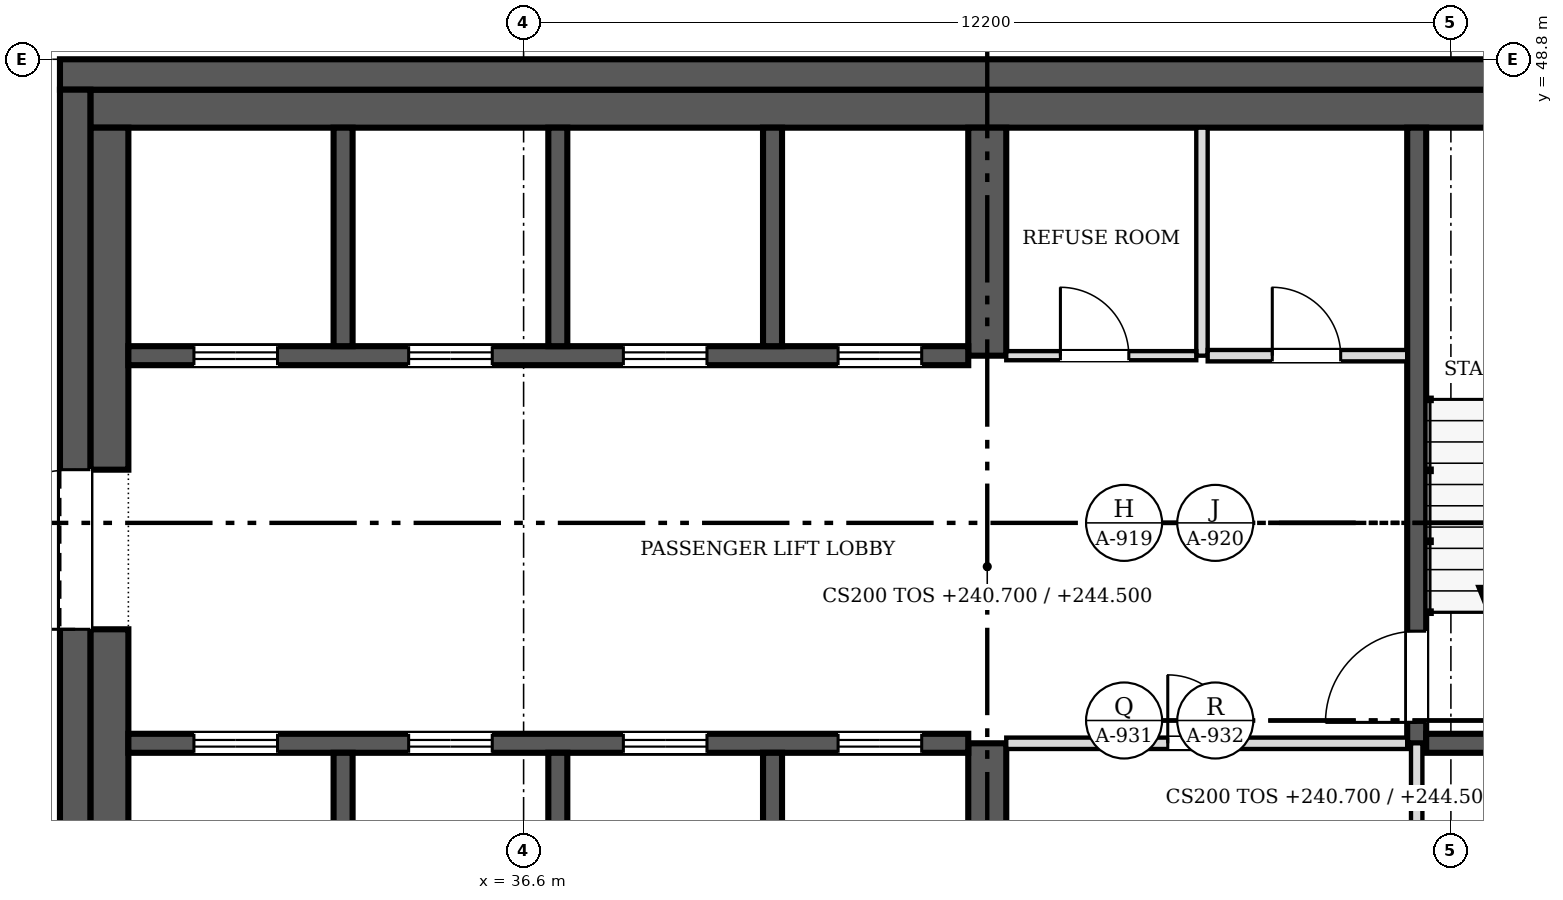
"""IFC4 building model, lengths in metres.
Left out: names, types, materials, properties, quantities, classifications, styles, units other than length and angle.
Written with IfcOpenShell. Run it as: python <this file> out.ifc"""

import sys

from ifc_helpers import new_model, si_unit, direction, frame, frame_2d, origin, place, context, subcontext, project, spatial, rectangle, extrude, source, transform, mapped, element, fill, save


model = new_model("IFC4")
c1 = context("Model", 3, precision=1e-05, world=origin(), true_north=direction((0.0, 1.0)))
c2 = subcontext(c1, "Body", "Model", "MODEL_VIEW")
j1 = project(units=[si_unit("LENGTHUNIT", "METRE"), si_unit("PLANEANGLEUNIT", "RADIAN")], contexts=[c1])
p1 = place(None, origin())
s1 = spatial("IfcSite", under=j1, at=p1, CompositionType="ELEMENT")
p2 = place(p1, origin())
s2 = spatial("IfcBuilding", under=s1, at=p2, CompositionType="ELEMENT")
p3 = place(p2, frame((0.0, 0.0, 240.7)))
s3 = spatial("IfcBuildingStorey", under=s2, at=p3, CompositionType="ELEMENT", Elevation=240.7)
p4 = place(p3, frame((30.7, 24.8, 0.0), z_axis=(0.0, 0.0, 1.0), x_axis=(0.0, 1.0, 0.0)))
e1 = element("IfcWall", 1, at=p4, inside=s3, PredefinedType="SHEAR", context=c2, shape_type="SweptSolid", body=[
    extrude(rectangle(XDim=23.6, YDim=0.4, at=frame_2d((11.8, 0.0))), origin(), (0.0, 0.0, 1.0), 3.8),
])
m1 = source(origin(), c2, "Body", "SweptSolid", [
    extrude(rectangle(XDim=2.1, YDim=2.4, at=frame_2d((1.05, 1.2))), frame((0.0, 0.21, 0.0), z_axis=(0.0, -1.0, 0.0), x_axis=(1.0, 0.0, 0.0)), (0.0, 0.0, 1.0), 0.42),
])
p5 = place(p4, frame((5.0, 0.0, 0.0)))
e2 = element("IfcOpeningElement", 2, at=p5, cuts=e1, PredefinedType="OPENING", context=c2, shape_type="MappedRepresentation", body=[
    mapped(m1, transform((0.0, 0.0, 0.0), scale=1.0)),
])
p6 = place(p4, frame((16.5, 0.0, 0.0)))
e3 = element("IfcOpeningElement", 3, at=p6, cuts=e1, PredefinedType="OPENING", context=c2, shape_type="MappedRepresentation", body=[
    mapped(m1, transform((0.0, 0.0, 0.0), scale=1.0)),
])
p7 = place(p3, frame((30.5, 48.6, 0.0), z_axis=(0.0, 0.0, 1.0), x_axis=(1.0, 0.0, 0.0)))
e4 = element("IfcWall", 4, at=p7, inside=s3, PredefinedType="SHEAR", context=c2, shape_type="SweptSolid", body=[
    extrude(rectangle(XDim=24.4, YDim=0.4, at=frame_2d((12.2, 0.0))), origin(), (0.0, 0.0, 1.0), 3.8),
])
p8 = place(p3, frame((30.9, 48.15, 0.0), z_axis=(0.0, 0.0, 1.0), x_axis=(1.0, 0.0, 0.0)))
e5 = element("IfcWall", 5, at=p8, inside=s3, PredefinedType="SOLIDWALL", context=c2, shape_type="SweptSolid", body=[
    extrude(rectangle(XDim=23.6, YDim=0.5, at=frame_2d((11.8, 0.0))), origin(), (0.0, 0.0, 1.0), 3.8),
])
p9 = place(p3, frame((31.15, 31.9, 0.0), z_axis=(0.0, 0.0, 1.0), x_axis=(0.0, 1.0, 0.0)))
e6 = element("IfcWall", 6, at=p9, inside=s3, PredefinedType="SOLIDWALL", context=c2, shape_type="SweptSolid", body=[
    extrude(rectangle(XDim=9.4, YDim=0.5, at=frame_2d((4.7, 0.0))), origin(), (0.0, 0.0, 1.0), 3.8),
])
p10 = place(p3, frame((31.15, 43.4, 0.0), z_axis=(0.0, 0.0, 1.0), x_axis=(0.0, 1.0, 0.0)))
e7 = element("IfcWall", 7, at=p10, inside=s3, PredefinedType="SOLIDWALL", context=c2, shape_type="SweptSolid", body=[
    extrude(rectangle(XDim=4.5, YDim=0.5, at=frame_2d((2.25, 0.0))), origin(), (0.0, 0.0, 1.0), 3.8),
])
p11 = place(p3, frame((42.7, 36.85, 0.0), z_axis=(0.0, 0.0, 1.0), x_axis=(0.0, 1.0, 0.0)))
e8 = element("IfcWall", 8, at=p11, inside=s3, PredefinedType="SHEAR", context=c2, shape_type="SweptSolid", body=[
    extrude(rectangle(XDim=2.95, YDim=0.5, at=frame_2d((1.475, 0.0))), origin(), (0.0, 0.0, 1.0), 3.8),
])
p12 = place(p3, frame((42.7, 44.9, 0.0), z_axis=(0.0, 0.0, 1.0), x_axis=(0.0, 1.0, 0.0)))
e9 = element("IfcWall", 9, at=p12, inside=s3, PredefinedType="SHEAR", context=c2, shape_type="SweptSolid", body=[
    extrude(rectangle(XDim=3.0, YDim=0.5, at=frame_2d((1.5, 0.0))), origin(), (0.0, 0.0, 1.0), 3.8),
])
p13 = place(p3, frame((31.4, 39.8, 0.0), z_axis=(0.0, 0.0, 1.0), x_axis=(1.0, 0.0, 0.0)))
e10 = element("IfcWall", 10, at=p13, inside=s3, PredefinedType="SOLIDWALL", context=c2, shape_type="SweptSolid", body=[
    extrude(rectangle(XDim=11.05, YDim=0.25, at=frame_2d((5.525, 0.0))), origin(), (0.0, 0.0, 1.0), 3.8),
])
m2 = source(origin(), c2, "Body", "SweptSolid", [
    extrude(rectangle(XDim=1.1, YDim=2.1, at=frame_2d((0.55, 1.05))), frame((0.0, 0.135, 0.0), z_axis=(0.0, -1.0, 0.0), x_axis=(1.0, 0.0, 0.0)), (0.0, 0.0, 1.0), 0.27),
])
p14 = place(p13, frame((0.863, 0.0, 0.0)))
e11 = element("IfcOpeningElement", 11, at=p14, cuts=e10, PredefinedType="OPENING", context=c2, shape_type="MappedRepresentation", body=[
    mapped(m2, transform((0.0, 0.0, 0.0), scale=1.0)),
])
p15 = place(p13, frame((3.688, 0.0, 0.0)))
e12 = element("IfcOpeningElement", 12, at=p15, cuts=e10, PredefinedType="OPENING", context=c2, shape_type="MappedRepresentation", body=[
    mapped(m2, transform((0.0, 0.0, 0.0), scale=1.0)),
])
p16 = place(p13, frame((6.512, 0.0, 0.0)))
e13 = element("IfcOpeningElement", 13, at=p16, cuts=e10, PredefinedType="OPENING", context=c2, shape_type="MappedRepresentation", body=[
    mapped(m2, transform((0.0, 0.0, 0.0), scale=1.0)),
])
p17 = place(p13, frame((9.337, 0.0, 0.0)))
e14 = element("IfcOpeningElement", 14, at=p17, cuts=e10, PredefinedType="OPENING", context=c2, shape_type="MappedRepresentation", body=[
    mapped(m2, transform((0.0, 0.0, 0.0), scale=1.0)),
])
p18 = place(p3, frame((42.45, 44.9, 0.0), z_axis=(0.0, 0.0, 1.0), x_axis=(-1.0, 0.0, 0.0)))
e15 = element("IfcWall", 15, at=p18, inside=s3, PredefinedType="SOLIDWALL", context=c2, shape_type="SweptSolid", body=[
    extrude(rectangle(XDim=11.05, YDim=0.25, at=frame_2d((5.525, 0.0))), origin(), (0.0, 0.0, 1.0), 3.8),
])
p19 = place(p18, frame((9.087, 0.0, 0.0)))
e16 = element("IfcOpeningElement", 16, at=p19, cuts=e15, PredefinedType="OPENING", context=c2, shape_type="MappedRepresentation", body=[
    mapped(m2, transform((0.0, 0.0, 0.0), scale=1.0)),
])
p20 = place(p18, frame((6.262, 0.0, 0.0)))
e17 = element("IfcOpeningElement", 17, at=p20, cuts=e15, PredefinedType="OPENING", context=c2, shape_type="MappedRepresentation", body=[
    mapped(m2, transform((0.0, 0.0, 0.0), scale=1.0)),
])
p21 = place(p18, frame((3.438, 0.0, 0.0)))
e18 = element("IfcOpeningElement", 18, at=p21, cuts=e15, PredefinedType="OPENING", context=c2, shape_type="MappedRepresentation", body=[
    mapped(m2, transform((0.0, 0.0, 0.0), scale=1.0)),
])
p22 = place(p18, frame((0.613, 0.0, 0.0)))
e19 = element("IfcOpeningElement", 19, at=p22, cuts=e15, PredefinedType="OPENING", context=c2, shape_type="MappedRepresentation", body=[
    mapped(m2, transform((0.0, 0.0, 0.0), scale=1.0)),
])
p23 = place(p3, frame((48.35, 47.9, 0.0), z_axis=(0.0, 0.0, 1.0), x_axis=(0.0, -1.0, 0.0)))
e20 = element("IfcWall", 20, at=p23, inside=s3, PredefinedType="SOLIDWALL", context=c2, shape_type="SweptSolid", body=[
    extrude(rectangle(XDim=8.1, YDim=0.25, at=frame_2d((4.05, 0.0))), origin(), (0.0, 0.0, 1.0), 3.8),
])
m3 = source(origin(), c2, "Body", "SweptSolid", [
    extrude(rectangle(XDim=1.2, YDim=2.1, at=frame_2d((0.6, 1.05))), frame((0.0, 0.135, 0.0), z_axis=(0.0, -1.0, 0.0), x_axis=(1.0, 0.0, 0.0)), (0.0, 0.0, 1.0), 0.27),
])
p24 = place(p23, frame((6.625, 0.0, 0.0)))
e21 = element("IfcOpeningElement", 21, at=p24, cuts=e20, PredefinedType="OPENING", context=c2, shape_type="MappedRepresentation", body=[
    mapped(m3, transform((0.0, 0.0, 0.0), scale=1.0)),
])
p25 = place(p3, frame((48.475, 39.8, 0.0), z_axis=(0.0, 0.0, 1.0), x_axis=(1.0, 0.0, 0.0)))
e22 = element("IfcWall", 22, at=p25, inside=s3, PredefinedType="SOLIDWALL", context=c2, shape_type="SweptSolid", body=[
    extrude(rectangle(XDim=3.4, YDim=0.25, at=frame_2d((1.7, 0.0))), origin(), (0.0, 0.0, 1.0), 3.8),
])
for number, where, z_axis, x_axis in (
    (23, (34.225, 36.85, 0.0), (0.0, 0.0, 1.0), (0.0, 1.0, 0.0)),
    (24, (37.05, 36.85, 0.0), (0.0, 0.0, 1.0), (0.0, 1.0, 0.0)),
    (25, (39.875, 36.85, 0.0), (0.0, 0.0, 1.0), (0.0, 1.0, 0.0)),
):
    element("IfcWall", number, at=place(p3, frame(where, z_axis=z_axis, x_axis=x_axis)), inside=s3, PredefinedType="SOLIDWALL", context=c2, shape_type="SweptSolid", body=[
        extrude(rectangle(XDim=2.825, YDim=0.25, at=frame_2d((1.413, 0.0))), origin(), (0.0, 0.0, 1.0), 3.8),
    ])
for number, where, z_axis, x_axis in (
    (26, (34.225, 45.025, 0.0), (0.0, 0.0, 1.0), (0.0, 1.0, 0.0)),
    (27, (37.05, 45.025, 0.0), (0.0, 0.0, 1.0), (0.0, 1.0, 0.0)),
    (28, (39.875, 45.025, 0.0), (0.0, 0.0, 1.0), (0.0, 1.0, 0.0)),
):
    element("IfcWall", number, at=place(p3, frame(where, z_axis=z_axis, x_axis=x_axis)), inside=s3, PredefinedType="SOLIDWALL", context=c2, shape_type="SweptSolid", body=[
        extrude(rectangle(XDim=2.875, YDim=0.25, at=frame_2d((1.438, 0.0))), origin(), (0.0, 0.0, 1.0), 3.8),
    ])
p26 = place(p3, frame((48.225, 39.8, 0.0), z_axis=(0.0, 0.0, 1.0), x_axis=(-1.0, 0.0, 0.0)))
e29 = element("IfcWall", 29, at=p26, inside=s3, PredefinedType="PARTITIONING", context=c2, shape_type="SweptSolid", body=[
    extrude(rectangle(XDim=5.275, YDim=0.15, at=frame_2d((2.638, 0.0))), origin(), (0.0, 0.0, 1.0), 3.6),
])
m4 = source(origin(), c2, "Body", "SweptSolid", [
    extrude(rectangle(XDim=0.9, YDim=2.1, at=frame_2d((0.45, 1.05))), frame((0.0, 0.085, 0.0), z_axis=(0.0, -1.0, 0.0), x_axis=(1.0, 0.0, 0.0)), (0.0, 0.0, 1.0), 0.17),
])
p27 = place(p26, frame((2.25, 0.0, 0.0)))
e30 = element("IfcOpeningElement", 30, at=p27, cuts=e29, PredefinedType="OPENING", context=c2, shape_type="MappedRepresentation", body=[
    mapped(m4, transform((0.0, 0.0, 0.0), scale=1.0)),
])
p28 = place(p3, frame((48.35, 36.85, 0.0), z_axis=(0.0, 0.0, 1.0), x_axis=(0.0, 1.0, 0.0)))
e31 = element("IfcWall", 31, at=p28, inside=s3, PredefinedType="PARTITIONING", context=c2, shape_type="SweptSolid", body=[
    extrude(rectangle(XDim=2.95, YDim=0.15, at=frame_2d((1.475, 0.0))), origin(), (0.0, 0.0, 1.0), 3.6),
])
p29 = place(p3, frame((45.525, 44.9, 0.0), z_axis=(0.0, 0.0, 1.0), x_axis=(0.0, 1.0, 0.0)))
e32 = element("IfcWall", 32, at=p29, inside=s3, PredefinedType="PARTITIONING", context=c2, shape_type="SweptSolid", body=[
    extrude(rectangle(XDim=3.0, YDim=0.15, at=frame_2d((1.5, 0.0))), origin(), (0.0, 0.0, 1.0), 3.6),
])
p30 = place(p3, frame((42.95, 44.9, 0.0), z_axis=(0.0, 0.0, 1.0), x_axis=(1.0, 0.0, 0.0)))
e33 = element("IfcWall", 33, at=p30, inside=s3, PredefinedType="PARTITIONING", context=c2, shape_type="SweptSolid", body=[
    extrude(rectangle(XDim=2.5, YDim=0.12, at=frame_2d((1.25, 0.0))), origin(), (0.0, 0.0, 1.0), 3.6),
])
m5 = source(origin(), c2, "Body", "SweptSolid", [
    extrude(rectangle(XDim=0.9, YDim=2.1, at=frame_2d((0.45, 1.05))), frame((0.0, 0.07, 0.0), z_axis=(0.0, -1.0, 0.0), x_axis=(1.0, 0.0, 0.0)), (0.0, 0.0, 1.0), 0.14),
])
p31 = place(p30, frame((0.712, 0.0, 0.0)))
e34 = element("IfcOpeningElement", 34, at=p31, cuts=e33, PredefinedType="OPENING", context=c2, shape_type="MappedRepresentation", body=[
    mapped(m5, transform((0.0, 0.0, 0.0), scale=1.0)),
])
p32 = place(p3, frame((45.6, 44.9, 0.0), z_axis=(0.0, 0.0, 1.0), x_axis=(1.0, 0.0, 0.0)))
e35 = element("IfcWall", 35, at=p32, inside=s3, PredefinedType="PARTITIONING", context=c2, shape_type="SweptSolid", body=[
    extrude(rectangle(XDim=2.625, YDim=0.15, at=frame_2d((1.312, 0.0))), origin(), (0.0, 0.0, 1.0), 3.6),
])
p33 = place(p32, frame((0.85, 0.0, 0.0)))
e36 = element("IfcOpeningElement", 36, at=p33, cuts=e35, PredefinedType="OPENING", context=c2, shape_type="MappedRepresentation", body=[
    mapped(m4, transform((0.0, 0.0, 0.0), scale=1.0)),
])
m6 = source(origin(), c2, "Body", "SweptSolid", [
    extrude(rectangle(XDim=2.1, YDim=2.4, at=frame_2d((1.05, 1.2))), frame((0.0, 0.025, 0.0), z_axis=(0.0, -1.0, 0.0), x_axis=(1.0, 0.0, 0.0)), (0.0, 0.0, 1.0), 0.05),
])
p34 = place(p6, origin())
e37 = element("IfcDoor", 37, at=p34, inside=s3, OperationType="DOUBLE_DOOR_SINGLE_SWING", PredefinedType="DOOR", context=c2, shape_type="MappedRepresentation", body=[
    mapped(m6, transform((0.0, 0.0, 0.0), scale=1.0)),
])
fill(e3, e37)
m7 = source(origin(), c2, "Body", "SweptSolid", [
    extrude(rectangle(XDim=1.1, YDim=2.1, at=frame_2d((0.55, 1.05))), frame((0.0, 0.025, 0.0), z_axis=(0.0, -1.0, 0.0), x_axis=(1.0, 0.0, 0.0)), (0.0, 0.0, 1.0), 0.05),
])
p35 = place(p14, origin())
e38 = element("IfcDoor", 38, at=p35, inside=s3, OperationType="DOUBLE_DOOR_SLIDING", PredefinedType="DOOR", context=c2, shape_type="MappedRepresentation", body=[
    mapped(m7, transform((0.0, 0.0, 0.0), scale=1.0)),
])
fill(e11, e38)
p36 = place(p15, origin())
e39 = element("IfcDoor", 39, at=p36, inside=s3, OperationType="DOUBLE_DOOR_SLIDING", PredefinedType="DOOR", context=c2, shape_type="MappedRepresentation", body=[
    mapped(m7, transform((0.0, 0.0, 0.0), scale=1.0)),
])
fill(e12, e39)
p37 = place(p16, origin())
e40 = element("IfcDoor", 40, at=p37, inside=s3, OperationType="DOUBLE_DOOR_SLIDING", PredefinedType="DOOR", context=c2, shape_type="MappedRepresentation", body=[
    mapped(m7, transform((0.0, 0.0, 0.0), scale=1.0)),
])
fill(e13, e40)
p38 = place(p17, origin())
e41 = element("IfcDoor", 41, at=p38, inside=s3, OperationType="DOUBLE_DOOR_SLIDING", PredefinedType="DOOR", context=c2, shape_type="MappedRepresentation", body=[
    mapped(m7, transform((0.0, 0.0, 0.0), scale=1.0)),
])
fill(e14, e41)
p39 = place(p19, origin())
e42 = element("IfcDoor", 42, at=p39, inside=s3, OperationType="DOUBLE_DOOR_SLIDING", PredefinedType="DOOR", context=c2, shape_type="MappedRepresentation", body=[
    mapped(m7, transform((0.0, 0.0, 0.0), scale=1.0)),
])
fill(e16, e42)
p40 = place(p20, origin())
e43 = element("IfcDoor", 43, at=p40, inside=s3, OperationType="DOUBLE_DOOR_SLIDING", PredefinedType="DOOR", context=c2, shape_type="MappedRepresentation", body=[
    mapped(m7, transform((0.0, 0.0, 0.0), scale=1.0)),
])
fill(e17, e43)
p41 = place(p21, origin())
e44 = element("IfcDoor", 44, at=p41, inside=s3, OperationType="DOUBLE_DOOR_SLIDING", PredefinedType="DOOR", context=c2, shape_type="MappedRepresentation", body=[
    mapped(m7, transform((0.0, 0.0, 0.0), scale=1.0)),
])
fill(e18, e44)
p42 = place(p22, origin())
e45 = element("IfcDoor", 45, at=p42, inside=s3, OperationType="DOUBLE_DOOR_SLIDING", PredefinedType="DOOR", context=c2, shape_type="MappedRepresentation", body=[
    mapped(m7, transform((0.0, 0.0, 0.0), scale=1.0)),
])
fill(e19, e45)
m8 = source(origin(), c2, "Body", "SweptSolid", [
    extrude(rectangle(XDim=1.2, YDim=2.1, at=frame_2d((0.6, 1.05))), frame((0.0, 0.025, 0.0), z_axis=(0.0, -1.0, 0.0), x_axis=(1.0, 0.0, 0.0)), (0.0, 0.0, 1.0), 0.05),
])
p43 = place(p24, origin())
e46 = element("IfcDoor", 46, at=p43, inside=s3, OperationType="SINGLE_SWING_RIGHT", PredefinedType="DOOR", context=c2, shape_type="MappedRepresentation", body=[
    mapped(m8, transform((0.0, 0.0, 0.0), scale=1.0)),
])
fill(e21, e46)
m9 = source(origin(), c2, "Body", "SweptSolid", [
    extrude(rectangle(XDim=0.9, YDim=2.1, at=frame_2d((0.45, 1.05))), frame((0.0, 0.025, 0.0), z_axis=(0.0, -1.0, 0.0), x_axis=(1.0, 0.0, 0.0)), (0.0, 0.0, 1.0), 0.05),
])
p44 = place(p27, origin())
e47 = element("IfcDoor", 47, at=p44, inside=s3, OperationType="SINGLE_SWING_RIGHT", PredefinedType="DOOR", context=c2, shape_type="MappedRepresentation", body=[
    mapped(m9, transform((0.0, 0.0, 0.0), scale=1.0)),
])
fill(e30, e47)
p45 = place(p31, origin())
e48 = element("IfcDoor", 48, at=p45, inside=s3, OperationType="SINGLE_SWING_LEFT", PredefinedType="DOOR", context=c2, shape_type="MappedRepresentation", body=[
    mapped(m9, transform((0.0, 0.0, 0.0), scale=1.0)),
])
fill(e34, e48)
p46 = place(p33, origin())
e49 = element("IfcDoor", 49, at=p46, inside=s3, OperationType="SINGLE_SWING_LEFT", PredefinedType="DOOR", context=c2, shape_type="MappedRepresentation", body=[
    mapped(m9, transform((0.0, 0.0, 0.0), scale=1.0)),
])
fill(e36, e49)
save(model, sys.argv[1])
